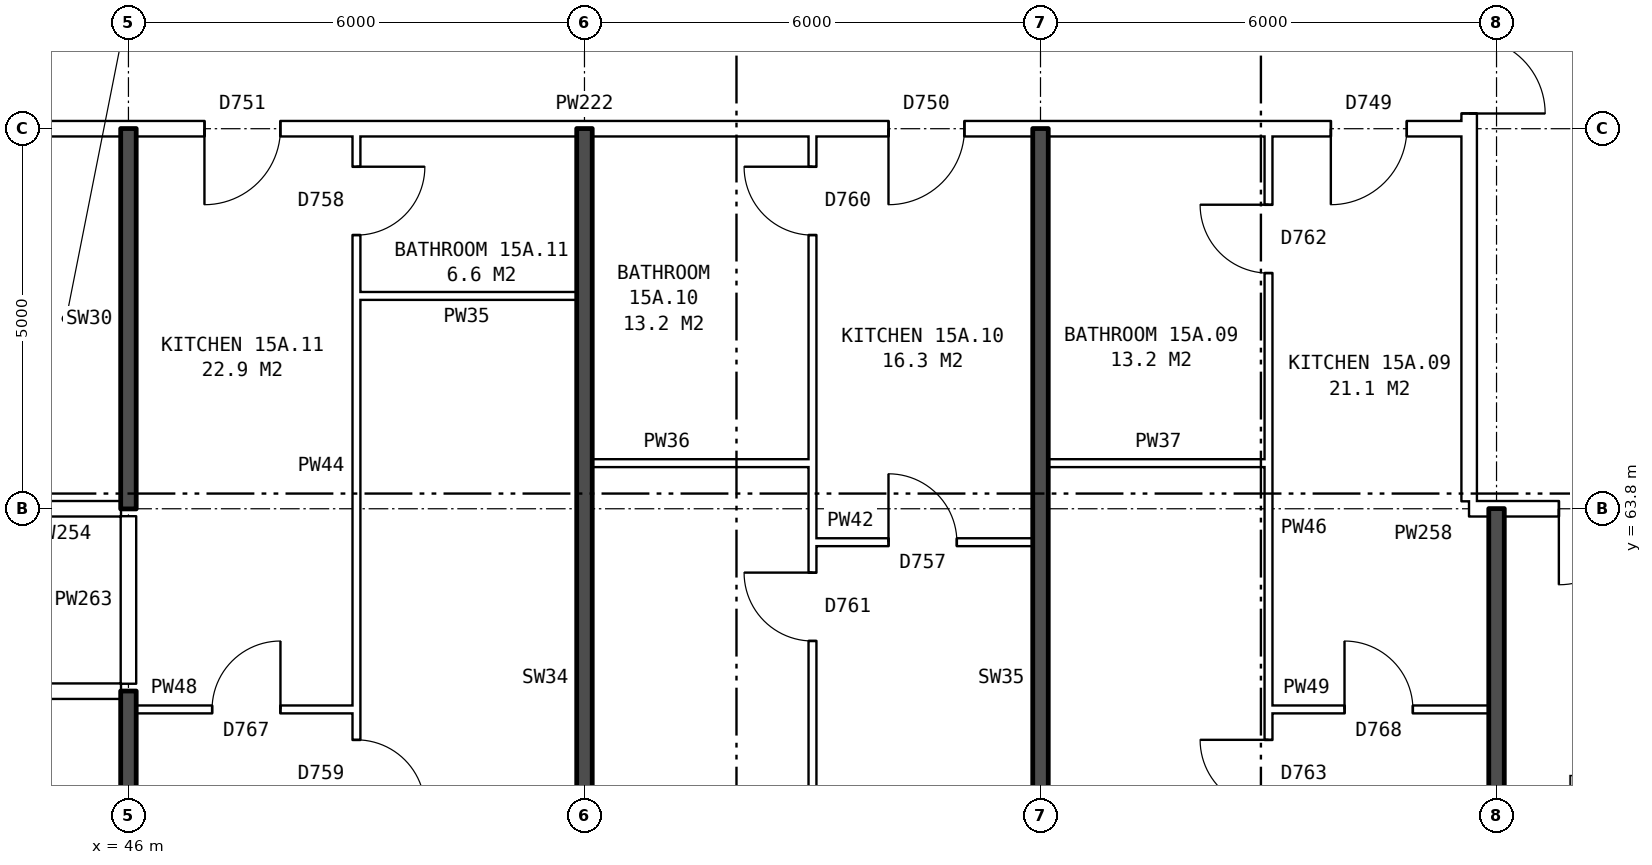
"""IFC4 building model, lengths in metres.
Left out: names, types, materials, properties, quantities, classifications, styles, units other than length and angle.
Written with IfcOpenShell. Run it as: python <this file> out.ifc"""

import sys

from ifc_helpers import new_model, si_unit, direction, frame, frame_2d, origin, place, context, subcontext, project, spatial, rectangle, extrude, element, fill, save


model = new_model("IFC4")
c1 = context("Model", 3, precision=1e-05, world=origin(), true_north=direction((0.0, 1.0)))
c2 = subcontext(c1, "Body", "Model", "MODEL_VIEW")
j1 = project(units=[si_unit("LENGTHUNIT", "METRE"), si_unit("PLANEANGLEUNIT", "RADIAN")], contexts=[c1])
p1 = place(None, origin())
s1 = spatial("IfcSite", under=j1, at=p1, CompositionType="ELEMENT")
p2 = place(p1, origin())
s2 = spatial("IfcBuilding", under=s1, at=p2, CompositionType="ELEMENT")
p3 = place(p2, frame((0.0, 0.0, 56.7)))
s3 = spatial("IfcBuildingStorey", under=s2, at=p3, CompositionType="ELEMENT", Elevation=56.7)
p4 = place(p3, frame((63.64, 63.9, 0.0), z_axis=(0.0, 0.0, 1.0), x_axis=(0.0, 1.0, 0.0)))
e1 = element("IfcWall", 1, at=p4, inside=s3, PredefinedType="PARTITIONING", context=c2, shape_type="SweptSolid", body=[
    extrude(rectangle(XDim=12.2, YDim=0.2, at=frame_2d((6.1, 0.0))), origin(), (0.0, 0.0, 1.0), 2.85),
])
p5 = place(p4, frame((5.1, 0.0, 0.0)))
e2 = element("IfcOpeningElement", 2, at=p5, cuts=e1, PredefinedType="OPENING", context=c2, shape_type="SweptSolid", body=[
    extrude(rectangle(XDim=2.0, YDim=2.1, at=frame_2d((1.0, 1.05))), frame((0.0, 0.11, 0.0), z_axis=(0.0, -1.0, 0.0), x_axis=(1.0, 0.0, 0.0)), (0.0, 0.0, 1.0), 0.22),
])
p6 = place(p3, frame((46.1, 61.16, 0.0), z_axis=(0.0, 0.0, 1.0), x_axis=(1.0, 0.0, 0.0)))
e3 = element("IfcWall", 3, at=p6, inside=s3, PredefinedType="PARTITIONING", context=c2, shape_type="SweptSolid", body=[
    extrude(rectangle(XDim=2.9, YDim=0.1, at=frame_2d((1.45, 0.0))), origin(), (0.0, 0.0, 1.0), 2.85),
])
p7 = place(p6, frame((1.0, 0.0, 0.0)))
e4 = element("IfcOpeningElement", 4, at=p7, cuts=e3, PredefinedType="OPENING", context=c2, shape_type="SweptSolid", body=[
    extrude(rectangle(XDim=0.9, YDim=2.1, at=frame_2d((0.45, 1.05))), frame((0.0, 0.06, 0.0), z_axis=(0.0, -1.0, 0.0), x_axis=(1.0, 0.0, 0.0)), (0.0, 0.0, 1.0), 0.12),
])
p8 = place(p3, frame((61.0, 61.16, 0.0), z_axis=(0.0, 0.0, 1.0), x_axis=(1.0, 0.0, 0.0)))
e5 = element("IfcWall", 5, at=p8, inside=s3, PredefinedType="PARTITIONING", context=c2, shape_type="SweptSolid", body=[
    extrude(rectangle(XDim=2.9, YDim=0.1, at=frame_2d((1.45, 0.0))), origin(), (0.0, 0.0, 1.0), 2.85),
])
p9 = place(p8, frame((1.0, 0.0, 0.0)))
e6 = element("IfcOpeningElement", 6, at=p9, cuts=e5, PredefinedType="OPENING", context=c2, shape_type="SweptSolid", body=[
    extrude(rectangle(XDim=0.9, YDim=2.1, at=frame_2d((0.45, 1.05))), frame((0.0, 0.06, 0.0), z_axis=(0.0, -1.0, 0.0), x_axis=(1.0, 0.0, 0.0)), (0.0, 0.0, 1.0), 0.12),
])
p10 = place(p3, frame((21.86, 61.4, 0.0), z_axis=(0.0, 0.0, 1.0), x_axis=(1.0, 0.0, 0.0)))
e7 = element("IfcWall", 7, at=p10, inside=s3, PredefinedType="PARTITIONING", context=c2, shape_type="SweptSolid", body=[
    extrude(rectangle(XDim=24.04, YDim=0.2, at=frame_2d((12.02, 0.0))), origin(), (0.0, 0.0, 1.0), 2.85),
])
p11 = place(p10, frame((19.44, 0.0, 0.0)))
e8 = element("IfcOpeningElement", 8, at=p11, cuts=e7, PredefinedType="OPENING", context=c2, shape_type="SweptSolid", body=[
    extrude(rectangle(XDim=1.0, YDim=2.1, at=frame_2d((0.5, 1.05))), frame((0.0, 0.11, 0.0), z_axis=(0.0, -1.0, 0.0), x_axis=(1.0, 0.0, 0.0)), (0.0, 0.0, 1.0), 0.22),
])
p12 = place(p10, frame((14.64, 0.0, 0.0)))
e9 = element("IfcOpeningElement", 9, at=p12, cuts=e7, PredefinedType="OPENING", context=c2, shape_type="SweptSolid", body=[
    extrude(rectangle(XDim=1.0, YDim=2.1, at=frame_2d((0.5, 1.05))), frame((0.0, 0.11, 0.0), z_axis=(0.0, -1.0, 0.0), x_axis=(1.0, 0.0, 0.0)), (0.0, 0.0, 1.0), 0.22),
])
p13 = place(p10, frame((2.57, 0.0, 0.0)))
e10 = element("IfcOpeningElement", 10, at=p13, cuts=e7, PredefinedType="OPENING", context=c2, shape_type="SweptSolid", body=[
    extrude(rectangle(XDim=1.0, YDim=2.1, at=frame_2d((0.5, 1.05))), frame((0.0, 0.11, 0.0), z_axis=(0.0, -1.0, 0.0), x_axis=(1.0, 0.0, 0.0)), (0.0, 0.0, 1.0), 0.22),
])
p14 = place(p3, frame((55.0, 63.36, 0.0), z_axis=(0.0, 0.0, 1.0), x_axis=(1.0, 0.0, 0.0)))
e11 = element("IfcWall", 11, at=p14, inside=s3, PredefinedType="PARTITIONING", context=c2, shape_type="SweptSolid", body=[
    extrude(rectangle(XDim=2.9, YDim=0.1, at=frame_2d((1.45, 0.0))), origin(), (0.0, 0.0, 1.0), 2.85),
])
p15 = place(p14, frame((1.0, 0.0, 0.0)))
e12 = element("IfcOpeningElement", 12, at=p15, cuts=e11, PredefinedType="OPENING", context=c2, shape_type="SweptSolid", body=[
    extrude(rectangle(XDim=0.9, YDim=2.1, at=frame_2d((0.45, 1.05))), frame((0.0, 0.06, 0.0), z_axis=(0.0, -1.0, 0.0), x_axis=(1.0, 0.0, 0.0)), (0.0, 0.0, 1.0), 0.12),
])
p16 = place(p3, frame((44.36, 63.8, 0.0), z_axis=(0.0, 0.0, 1.0), x_axis=(1.0, 0.0, 0.0)))
e13 = element("IfcWall", 13, at=p16, inside=s3, PredefinedType="PARTITIONING", context=c2, shape_type="SweptSolid", body=[
    extrude(rectangle(XDim=1.54, YDim=0.2, at=frame_2d((0.77, 0.0))), origin(), (0.0, 0.0, 1.0), 2.85),
])
p17 = place(p3, frame((63.64, 63.8, 0.0), z_axis=(0.0, 0.0, 1.0), x_axis=(1.0, 0.0, 0.0)))
e14 = element("IfcWall", 14, at=p17, inside=s3, PredefinedType="PARTITIONING", context=c2, shape_type="SweptSolid", body=[
    extrude(rectangle(XDim=3.0, YDim=0.2, at=frame_2d((1.5, 0.0))), origin(), (0.0, 0.0, 1.0), 2.85),
])
p18 = place(p17, frame((1.18, 0.0, 0.0)))
e15 = element("IfcOpeningElement", 15, at=p18, cuts=e14, PredefinedType="OPENING", context=c2, shape_type="SweptSolid", body=[
    extrude(rectangle(XDim=1.0, YDim=2.1, at=frame_2d((0.5, 1.05))), frame((0.0, 0.11, 0.0), z_axis=(0.0, -1.0, 0.0), x_axis=(1.0, 0.0, 0.0)), (0.0, 0.0, 1.0), 0.22),
])
for number, where, z_axis, x_axis in (
    (16, (52.1, 64.4, 0.0), (0.0, 0.0, 1.0), (1.0, 0.0, 0.0)),
    (17, (58.1, 64.4, 0.0), (0.0, 0.0, 1.0), (1.0, 0.0, 0.0)),
    (18, (49.0, 66.6, 0.0), (0.0, 0.0, 1.0), (1.0, 0.0, 0.0)),
):
    element("IfcWall", number, at=place(p3, frame(where, z_axis=z_axis, x_axis=x_axis)), inside=s3, PredefinedType="PARTITIONING", context=c2, shape_type="SweptSolid", body=[
        extrude(rectangle(XDim=2.9, YDim=0.1, at=frame_2d((1.45, 0.0))), origin(), (0.0, 0.0, 1.0), 2.85),
    ])
p19 = place(p3, frame((44.36, 68.8, 0.0), z_axis=(0.0, 0.0, 1.0), x_axis=(1.0, 0.0, 0.0)))
e19 = element("IfcWall", 19, at=p19, inside=s3, PredefinedType="PARTITIONING", context=c2, shape_type="SweptSolid", body=[
    extrude(rectangle(XDim=19.28, YDim=0.2, at=frame_2d((9.64, 0.0))), origin(), (0.0, 0.0, 1.0), 2.85),
])
p20 = place(p19, frame((17.46, 0.0, 0.0)))
e20 = element("IfcOpeningElement", 20, at=p20, cuts=e19, PredefinedType="OPENING", context=c2, shape_type="SweptSolid", body=[
    extrude(rectangle(XDim=1.0, YDim=2.1, at=frame_2d((0.5, 1.05))), frame((0.0, 0.11, 0.0), z_axis=(0.0, -1.0, 0.0), x_axis=(1.0, 0.0, 0.0)), (0.0, 0.0, 1.0), 0.22),
])
p21 = place(p19, frame((11.64, 0.0, 0.0)))
e21 = element("IfcOpeningElement", 21, at=p21, cuts=e19, PredefinedType="OPENING", context=c2, shape_type="SweptSolid", body=[
    extrude(rectangle(XDim=1.0, YDim=2.1, at=frame_2d((0.5, 1.05))), frame((0.0, 0.11, 0.0), z_axis=(0.0, -1.0, 0.0), x_axis=(1.0, 0.0, 0.0)), (0.0, 0.0, 1.0), 0.22),
])
p22 = place(p19, frame((2.64, 0.0, 0.0)))
e22 = element("IfcOpeningElement", 22, at=p22, cuts=e19, PredefinedType="OPENING", context=c2, shape_type="SweptSolid", body=[
    extrude(rectangle(XDim=1.0, YDim=2.1, at=frame_2d((0.5, 1.05))), frame((0.0, 0.11, 0.0), z_axis=(0.0, -1.0, 0.0), x_axis=(1.0, 0.0, 0.0)), (0.0, 0.0, 1.0), 0.22),
])
p23 = place(p3, frame((46.0, 54.36, 0.0), z_axis=(0.0, 0.0, 1.0), x_axis=(0.0, 1.0, 0.0)))
e23 = element("IfcWall", 23, at=p23, inside=s3, PredefinedType="SOLIDWALL", context=c2, shape_type="SweptSolid", body=[
    extrude(rectangle(XDim=7.04, YDim=0.2, at=frame_2d((3.52, 0.0))), origin(), (0.0, 0.0, 1.0), 2.85),
])
p24 = place(p3, frame((46.0, 61.5, 0.0), z_axis=(0.0, 0.0, 1.0), x_axis=(0.0, 1.0, 0.0)))
e24 = element("IfcWall", 24, at=p24, inside=s3, PredefinedType="PARTITIONING", context=c2, shape_type="SweptSolid", body=[
    extrude(rectangle(XDim=2.2, YDim=0.2, at=frame_2d((1.1, 0.0))), origin(), (0.0, 0.0, 1.0), 2.85),
])
p25 = place(p3, frame((46.0, 63.8, 0.0), z_axis=(0.0, 0.0, 1.0), x_axis=(0.0, 1.0, 0.0)))
e25 = element("IfcWall", 25, at=p25, inside=s3, PredefinedType="SOLIDWALL", context=c2, shape_type="SweptSolid", body=[
    extrude(rectangle(XDim=5.0, YDim=0.2, at=frame_2d((2.5, 0.0))), origin(), (0.0, 0.0, 1.0), 2.85),
])
p26 = place(p3, frame((49.0, 54.36, 0.0), z_axis=(0.0, 0.0, 1.0), x_axis=(0.0, 1.0, 0.0)))
e26 = element("IfcWall", 26, at=p26, inside=s3, PredefinedType="PARTITIONING", context=c2, shape_type="SweptSolid", body=[
    extrude(rectangle(XDim=14.34, YDim=0.1, at=frame_2d((7.17, 0.0))), origin(), (0.0, 0.0, 1.0), 2.85),
])
p27 = place(p26, frame((5.5, 0.0, 0.0)))
e27 = element("IfcOpeningElement", 27, at=p27, cuts=e26, PredefinedType="OPENING", context=c2, shape_type="SweptSolid", body=[
    extrude(rectangle(XDim=0.9, YDim=2.1, at=frame_2d((0.45, 1.05))), frame((0.0, 0.06, 0.0), z_axis=(0.0, -1.0, 0.0), x_axis=(1.0, 0.0, 0.0)), (0.0, 0.0, 1.0), 0.12),
])
p28 = place(p26, frame((13.04, 0.0, 0.0)))
e28 = element("IfcOpeningElement", 28, at=p28, cuts=e26, PredefinedType="OPENING", context=c2, shape_type="SweptSolid", body=[
    extrude(rectangle(XDim=0.9, YDim=2.1, at=frame_2d((0.45, 1.05))), frame((0.0, 0.06, 0.0), z_axis=(0.0, -1.0, 0.0), x_axis=(1.0, 0.0, 0.0)), (0.0, 0.0, 1.0), 0.12),
])
p29 = place(p3, frame((52.0, 54.36, 0.0), z_axis=(0.0, 0.0, 1.0), x_axis=(0.0, 1.0, 0.0)))
e29 = element("IfcWall", 29, at=p29, inside=s3, PredefinedType="SOLIDWALL", context=c2, shape_type="SweptSolid", body=[
    extrude(rectangle(XDim=14.44, YDim=0.2, at=frame_2d((7.22, 0.0))), origin(), (0.0, 0.0, 1.0), 2.85),
])
p30 = place(p3, frame((55.0, 54.36, 0.0), z_axis=(0.0, 0.0, 1.0), x_axis=(0.0, 1.0, 0.0)))
e30 = element("IfcWall", 30, at=p30, inside=s3, PredefinedType="PARTITIONING", context=c2, shape_type="SweptSolid", body=[
    extrude(rectangle(XDim=14.34, YDim=0.1, at=frame_2d((7.17, 0.0))), origin(), (0.0, 0.0, 1.0), 2.85),
])
p31 = place(p30, frame((7.7, 0.0, 0.0)))
e31 = element("IfcOpeningElement", 31, at=p31, cuts=e30, PredefinedType="OPENING", context=c2, shape_type="SweptSolid", body=[
    extrude(rectangle(XDim=0.9, YDim=2.1, at=frame_2d((0.45, 1.05))), frame((0.0, 0.06, 0.0), z_axis=(0.0, -1.0, 0.0), x_axis=(1.0, 0.0, 0.0)), (0.0, 0.0, 1.0), 0.12),
])
p32 = place(p30, frame((13.04, 0.0, 0.0)))
e32 = element("IfcOpeningElement", 32, at=p32, cuts=e30, PredefinedType="OPENING", context=c2, shape_type="SweptSolid", body=[
    extrude(rectangle(XDim=0.9, YDim=2.1, at=frame_2d((0.45, 1.05))), frame((0.0, 0.06, 0.0), z_axis=(0.0, -1.0, 0.0), x_axis=(1.0, 0.0, 0.0)), (0.0, 0.0, 1.0), 0.12),
])
p33 = place(p3, frame((58.0, 54.36, 0.0), z_axis=(0.0, 0.0, 1.0), x_axis=(0.0, 1.0, 0.0)))
e33 = element("IfcWall", 33, at=p33, inside=s3, PredefinedType="SOLIDWALL", context=c2, shape_type="SweptSolid", body=[
    extrude(rectangle(XDim=14.44, YDim=0.2, at=frame_2d((7.22, 0.0))), origin(), (0.0, 0.0, 1.0), 2.85),
])
p34 = place(p3, frame((61.0, 54.36, 0.0), z_axis=(0.0, 0.0, 1.0), x_axis=(0.0, 1.0, 0.0)))
e34 = element("IfcWall", 34, at=p34, inside=s3, PredefinedType="PARTITIONING", context=c2, shape_type="SweptSolid", body=[
    extrude(rectangle(XDim=14.34, YDim=0.1, at=frame_2d((7.17, 0.0))), origin(), (0.0, 0.0, 1.0), 2.85),
])
p35 = place(p34, frame((5.5, 0.0, 0.0)))
e35 = element("IfcOpeningElement", 35, at=p35, cuts=e34, PredefinedType="OPENING", context=c2, shape_type="SweptSolid", body=[
    extrude(rectangle(XDim=0.9, YDim=2.1, at=frame_2d((0.45, 1.05))), frame((0.0, 0.06, 0.0), z_axis=(0.0, -1.0, 0.0), x_axis=(1.0, 0.0, 0.0)), (0.0, 0.0, 1.0), 0.12),
])
p36 = place(p34, frame((12.54, 0.0, 0.0)))
e36 = element("IfcOpeningElement", 36, at=p36, cuts=e34, PredefinedType="OPENING", context=c2, shape_type="SweptSolid", body=[
    extrude(rectangle(XDim=0.9, YDim=2.1, at=frame_2d((0.45, 1.05))), frame((0.0, 0.06, 0.0), z_axis=(0.0, -1.0, 0.0), x_axis=(1.0, 0.0, 0.0)), (0.0, 0.0, 1.0), 0.12),
])
p37 = place(p3, frame((64.0, 54.36, 0.0), z_axis=(0.0, 0.0, 1.0), x_axis=(0.0, 1.0, 0.0)))
e37 = element("IfcWall", 37, at=p37, inside=s3, PredefinedType="SOLIDWALL", context=c2, shape_type="SweptSolid", body=[
    extrude(rectangle(XDim=9.44, YDim=0.2, at=frame_2d((4.72, 0.0))), origin(), (0.0, 0.0, 1.0), 2.85),
])
p38 = place(p5, frame((2.0, 0.0, 0.0), z_axis=(0.0, 0.0, 1.0), x_axis=(-1.0, 0.0, 0.0)))
e38 = element("IfcDoor", 38, at=p38, inside=s3, OperationType="DOUBLE_DOOR_SINGLE_SWING", PredefinedType="DOOR", context=c2, shape_type="SweptSolid", body=[
    extrude(rectangle(XDim=2.0, YDim=2.1, at=frame_2d((1.0, 1.05))), frame((0.0, 0.025, 0.0), z_axis=(0.0, -1.0, 0.0), x_axis=(1.0, 0.0, 0.0)), (0.0, 0.0, 1.0), 0.05),
])
fill(e2, e38)
p39 = place(p18, frame((1.0, 0.0, 0.0), z_axis=(0.0, 0.0, 1.0), x_axis=(-1.0, 0.0, 0.0)))
e39 = element("IfcDoor", 39, at=p39, inside=s3, OperationType="SINGLE_SWING_RIGHT", PredefinedType="DOOR", context=c2, shape_type="SweptSolid", body=[
    extrude(rectangle(XDim=1.0, YDim=2.1, at=frame_2d((0.5, 1.05))), frame((0.0, 0.025, 0.0), z_axis=(0.0, -1.0, 0.0), x_axis=(1.0, 0.0, 0.0)), (0.0, 0.0, 1.0), 0.05),
])
fill(e15, e39)
p40 = place(p35, origin())
e40 = element("IfcDoor", 40, at=p40, inside=s3, OperationType="SINGLE_SWING_RIGHT", PredefinedType="DOOR", context=c2, shape_type="SweptSolid", body=[
    extrude(rectangle(XDim=0.9, YDim=2.1, at=frame_2d((0.45, 1.05))), frame((0.0, 0.025, 0.0), z_axis=(0.0, -1.0, 0.0), x_axis=(1.0, 0.0, 0.0)), (0.0, 0.0, 1.0), 0.05),
])
fill(e35, e40)
p41 = place(p20, frame((1.0, 0.0, 0.0), z_axis=(0.0, 0.0, 1.0), x_axis=(-1.0, 0.0, 0.0)))
e41 = element("IfcDoor", 41, at=p41, inside=s3, OperationType="SINGLE_SWING_RIGHT", PredefinedType="DOOR", context=c2, shape_type="SweptSolid", body=[
    extrude(rectangle(XDim=1.0, YDim=2.1, at=frame_2d((0.5, 1.05))), frame((0.0, 0.025, 0.0), z_axis=(0.0, -1.0, 0.0), x_axis=(1.0, 0.0, 0.0)), (0.0, 0.0, 1.0), 0.05),
])
fill(e20, e41)
p42 = place(p9, origin())
e42 = element("IfcDoor", 42, at=p42, inside=s3, OperationType="SINGLE_SWING_LEFT", PredefinedType="DOOR", context=c2, shape_type="SweptSolid", body=[
    extrude(rectangle(XDim=0.9, YDim=2.1, at=frame_2d((0.45, 1.05))), frame((0.0, 0.025, 0.0), z_axis=(0.0, -1.0, 0.0), x_axis=(1.0, 0.0, 0.0)), (0.0, 0.0, 1.0), 0.05),
])
fill(e6, e42)
p43 = place(p36, origin())
e43 = element("IfcDoor", 43, at=p43, inside=s3, OperationType="SINGLE_SWING_RIGHT", PredefinedType="DOOR", context=c2, shape_type="SweptSolid", body=[
    extrude(rectangle(XDim=0.9, YDim=2.1, at=frame_2d((0.45, 1.05))), frame((0.0, 0.025, 0.0), z_axis=(0.0, -1.0, 0.0), x_axis=(1.0, 0.0, 0.0)), (0.0, 0.0, 1.0), 0.05),
])
fill(e36, e43)
p44 = place(p31, origin())
e44 = element("IfcDoor", 44, at=p44, inside=s3, OperationType="SINGLE_SWING_RIGHT", PredefinedType="DOOR", context=c2, shape_type="SweptSolid", body=[
    extrude(rectangle(XDim=0.9, YDim=2.1, at=frame_2d((0.45, 1.05))), frame((0.0, 0.025, 0.0), z_axis=(0.0, -1.0, 0.0), x_axis=(1.0, 0.0, 0.0)), (0.0, 0.0, 1.0), 0.05),
])
fill(e31, e44)
p45 = place(p21, frame((1.0, 0.0, 0.0), z_axis=(0.0, 0.0, 1.0), x_axis=(-1.0, 0.0, 0.0)))
e45 = element("IfcDoor", 45, at=p45, inside=s3, OperationType="SINGLE_SWING_RIGHT", PredefinedType="DOOR", context=c2, shape_type="SweptSolid", body=[
    extrude(rectangle(XDim=1.0, YDim=2.1, at=frame_2d((0.5, 1.05))), frame((0.0, 0.025, 0.0), z_axis=(0.0, -1.0, 0.0), x_axis=(1.0, 0.0, 0.0)), (0.0, 0.0, 1.0), 0.05),
])
fill(e21, e45)
p46 = place(p15, origin())
e46 = element("IfcDoor", 46, at=p46, inside=s3, OperationType="SINGLE_SWING_LEFT", PredefinedType="DOOR", context=c2, shape_type="SweptSolid", body=[
    extrude(rectangle(XDim=0.9, YDim=2.1, at=frame_2d((0.45, 1.05))), frame((0.0, 0.025, 0.0), z_axis=(0.0, -1.0, 0.0), x_axis=(1.0, 0.0, 0.0)), (0.0, 0.0, 1.0), 0.05),
])
fill(e12, e46)
p47 = place(p32, origin())
e47 = element("IfcDoor", 47, at=p47, inside=s3, OperationType="SINGLE_SWING_RIGHT", PredefinedType="DOOR", context=c2, shape_type="SweptSolid", body=[
    extrude(rectangle(XDim=0.9, YDim=2.1, at=frame_2d((0.45, 1.05))), frame((0.0, 0.025, 0.0), z_axis=(0.0, -1.0, 0.0), x_axis=(1.0, 0.0, 0.0)), (0.0, 0.0, 1.0), 0.05),
])
fill(e32, e47)
p48 = place(p27, frame((0.9, 0.0, 0.0), z_axis=(0.0, 0.0, 1.0), x_axis=(-1.0, 0.0, 0.0)))
e48 = element("IfcDoor", 48, at=p48, inside=s3, OperationType="SINGLE_SWING_RIGHT", PredefinedType="DOOR", context=c2, shape_type="SweptSolid", body=[
    extrude(rectangle(XDim=0.9, YDim=2.1, at=frame_2d((0.45, 1.05))), frame((0.0, 0.025, 0.0), z_axis=(0.0, -1.0, 0.0), x_axis=(1.0, 0.0, 0.0)), (0.0, 0.0, 1.0), 0.05),
])
fill(e27, e48)
p49 = place(p22, frame((1.0, 0.0, 0.0), z_axis=(0.0, 0.0, 1.0), x_axis=(-1.0, 0.0, 0.0)))
e49 = element("IfcDoor", 49, at=p49, inside=s3, OperationType="SINGLE_SWING_RIGHT", PredefinedType="DOOR", context=c2, shape_type="SweptSolid", body=[
    extrude(rectangle(XDim=1.0, YDim=2.1, at=frame_2d((0.5, 1.05))), frame((0.0, 0.025, 0.0), z_axis=(0.0, -1.0, 0.0), x_axis=(1.0, 0.0, 0.0)), (0.0, 0.0, 1.0), 0.05),
])
fill(e22, e49)
p50 = place(p7, origin())
e50 = element("IfcDoor", 50, at=p50, inside=s3, OperationType="SINGLE_SWING_RIGHT", PredefinedType="DOOR", context=c2, shape_type="SweptSolid", body=[
    extrude(rectangle(XDim=0.9, YDim=2.1, at=frame_2d((0.45, 1.05))), frame((0.0, 0.025, 0.0), z_axis=(0.0, -1.0, 0.0), x_axis=(1.0, 0.0, 0.0)), (0.0, 0.0, 1.0), 0.05),
])
fill(e4, e50)
p51 = place(p28, frame((0.9, 0.0, 0.0), z_axis=(0.0, 0.0, 1.0), x_axis=(-1.0, 0.0, 0.0)))
e51 = element("IfcDoor", 51, at=p51, inside=s3, OperationType="SINGLE_SWING_LEFT", PredefinedType="DOOR", context=c2, shape_type="SweptSolid", body=[
    extrude(rectangle(XDim=0.9, YDim=2.1, at=frame_2d((0.45, 1.05))), frame((0.0, 0.025, 0.0), z_axis=(0.0, -1.0, 0.0), x_axis=(1.0, 0.0, 0.0)), (0.0, 0.0, 1.0), 0.05),
])
fill(e28, e51)
save(model, sys.argv[1])
